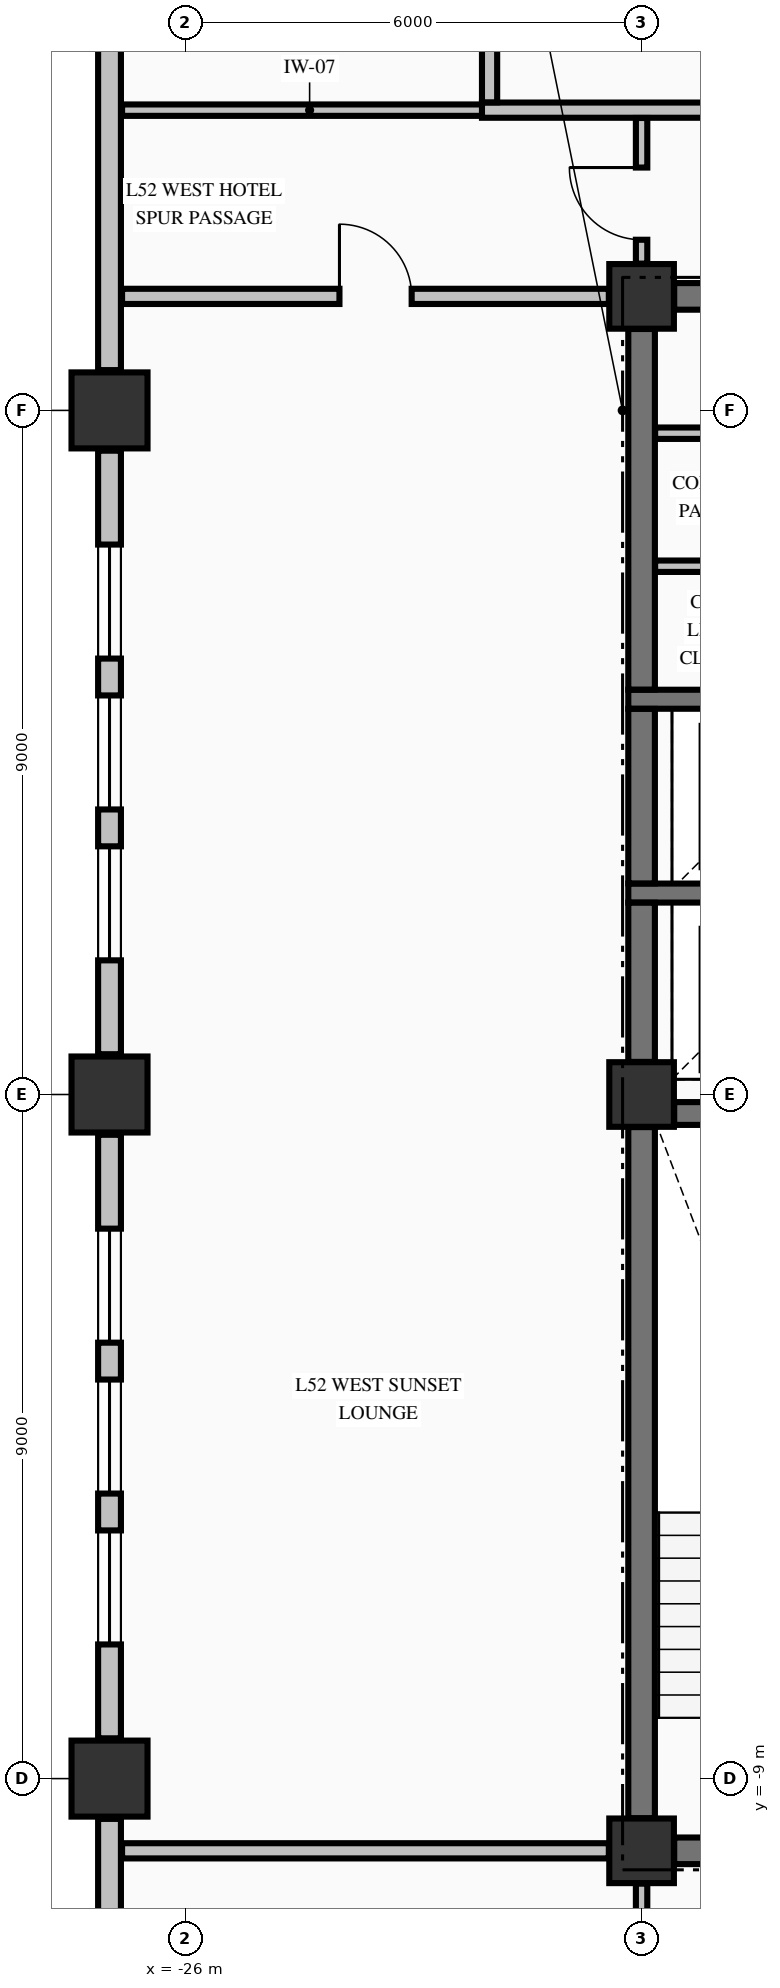
"""IFC4 building model, lengths in metres.
Left out: names, types, materials, properties, quantities, classifications, styles, units other than length and angle.
Written with IfcOpenShell. Run it as: python <this file> out.ifc"""

import sys

from ifc_helpers import new_model, si_unit, direction, frame, frame_2d, origin, origin_2d, place, context, subcontext, project, spatial, rectangle, extrude, element, fill, save


model = new_model("IFC4")
c1 = context("Model", 3, precision=1e-05, world=origin(), true_north=direction((0.0, 1.0)))
c2 = subcontext(c1, "Body", "Model", "MODEL_VIEW")
j1 = project(units=[si_unit("LENGTHUNIT", "METRE"), si_unit("PLANEANGLEUNIT", "RADIAN")], contexts=[c1])
p1 = place(None, origin())
s1 = spatial("IfcSite", under=j1, at=p1, CompositionType="ELEMENT")
p2 = place(p1, origin())
s2 = spatial("IfcBuilding", under=s1, at=p2, CompositionType="ELEMENT")
p3 = place(p2, frame((0.0, 0.0, 201.66)))
s3 = spatial("IfcBuildingStorey", under=s2, at=p3, CompositionType="ELEMENT", Elevation=201.66)
for number, where, z_axis, x_axis in (
    (1, (-27.0, -9.0, -0.25), (0.0, 0.0, 1.0), (1.0, 0.0, 0.0)),
    (2, (-27.0, 0.0, -0.25), (0.0, 0.0, 1.0), (1.0, 0.0, 0.0)),
    (3, (-27.0, 9.0, -0.25), (0.0, 0.0, 1.0), (1.0, 0.0, 0.0)),
):
    element("IfcColumn", number, at=place(p3, frame(where, z_axis=z_axis, x_axis=x_axis)), inside=s3, PredefinedType="COLUMN", context=c2, shape_type="SweptSolid", body=[
        extrude(rectangle(XDim=1.0, YDim=1.0, at=origin_2d()), origin(), (0.0, 0.0, 1.0), 3.4),
    ])
for number, where, z_axis, x_axis in (
    (4, (-20.0, -9.95, -0.25), (0.0, 0.0, 1.0), (1.0, 0.0, 0.0)),
    (5, (-20.0, 10.5, -0.25), (0.0, 0.0, 1.0), (1.0, 0.0, 0.0)),
    (6, (-20.0, 0.0, -0.25), (0.0, 0.0, 1.0), (1.0, 0.0, 0.0)),
):
    element("IfcColumn", number, at=place(p3, frame(where, z_axis=z_axis, x_axis=x_axis)), inside=s3, PredefinedType="COLUMN", context=c2, shape_type="SweptSolid", body=[
        extrude(rectangle(XDim=0.85, YDim=0.85, at=origin_2d()), origin(), (0.0, 0.0, 1.0), 3.4),
    ])
p4 = place(p3, frame((-27.0, -9.53, 0.0), z_axis=(0.0, 0.0, 1.0), x_axis=(0.0, -1.0, 0.0)))
e7 = element("IfcWall", 7, at=p4, inside=s3, PredefinedType="STANDARD", context=c2, shape_type="SweptSolid", body=[
    extrude(rectangle(XDim=9.44, YDim=0.3, at=frame_2d((4.72, 0.0))), origin(), (0.0, 0.0, 1.0), 2.542),
])
p5 = place(p3, frame((-27.0, -0.53, 0.0), z_axis=(0.0, 0.0, 1.0), x_axis=(0.0, -1.0, 0.0)))
e8 = element("IfcWall", 8, at=p5, inside=s3, PredefinedType="STANDARD", context=c2, shape_type="SweptSolid", body=[
    extrude(rectangle(XDim=7.94, YDim=0.3, at=frame_2d((3.97, 0.0))), origin(), (0.0, 0.0, 1.0), 2.542),
])
p6 = place(p5, frame((1.235, 0.0, 0.72)))
e9 = element("IfcOpeningElement", 9, at=p6, cuts=e8, PredefinedType="OPENING", context=c2, shape_type="SweptSolid", body=[
    extrude(rectangle(XDim=1.5, YDim=1.6, at=frame_2d((0.75, 0.8))), frame((0.0, 0.16, 0.0), z_axis=(0.0, -1.0, 0.0), x_axis=(1.0, 0.0, 0.0)), (0.0, 0.0, 1.0), 0.32),
])
p7 = place(p5, frame((3.22, 0.0, 0.72)))
e10 = element("IfcOpeningElement", 10, at=p7, cuts=e8, PredefinedType="OPENING", context=c2, shape_type="SweptSolid", body=[
    extrude(rectangle(XDim=1.5, YDim=1.6, at=frame_2d((0.75, 0.8))), frame((0.0, 0.16, 0.0), z_axis=(0.0, -1.0, 0.0), x_axis=(1.0, 0.0, 0.0)), (0.0, 0.0, 1.0), 0.32),
])
p8 = place(p5, frame((5.205, 0.0, 0.72)))
e11 = element("IfcOpeningElement", 11, at=p8, cuts=e8, PredefinedType="OPENING", context=c2, shape_type="SweptSolid", body=[
    extrude(rectangle(XDim=1.5, YDim=1.6, at=frame_2d((0.75, 0.8))), frame((0.0, 0.16, 0.0), z_axis=(0.0, -1.0, 0.0), x_axis=(1.0, 0.0, 0.0)), (0.0, 0.0, 1.0), 0.32),
])
p9 = place(p3, frame((-27.0, 8.47, 0.0), z_axis=(0.0, 0.0, 1.0), x_axis=(0.0, -1.0, 0.0)))
e12 = element("IfcWall", 12, at=p9, inside=s3, PredefinedType="STANDARD", context=c2, shape_type="SweptSolid", body=[
    extrude(rectangle(XDim=7.94, YDim=0.3, at=frame_2d((3.97, 0.0))), origin(), (0.0, 0.0, 1.0), 2.542),
])
p10 = place(p9, frame((1.235, 0.0, 0.72)))
e13 = element("IfcOpeningElement", 13, at=p10, cuts=e12, PredefinedType="OPENING", context=c2, shape_type="SweptSolid", body=[
    extrude(rectangle(XDim=1.5, YDim=1.6, at=frame_2d((0.75, 0.8))), frame((0.0, 0.16, 0.0), z_axis=(0.0, -1.0, 0.0), x_axis=(1.0, 0.0, 0.0)), (0.0, 0.0, 1.0), 0.32),
])
p11 = place(p9, frame((3.22, 0.0, 0.72)))
e14 = element("IfcOpeningElement", 14, at=p11, cuts=e12, PredefinedType="OPENING", context=c2, shape_type="SweptSolid", body=[
    extrude(rectangle(XDim=1.5, YDim=1.6, at=frame_2d((0.75, 0.8))), frame((0.0, 0.16, 0.0), z_axis=(0.0, -1.0, 0.0), x_axis=(1.0, 0.0, 0.0)), (0.0, 0.0, 1.0), 0.32),
])
p12 = place(p9, frame((5.205, 0.0, 0.72)))
e15 = element("IfcOpeningElement", 15, at=p12, cuts=e12, PredefinedType="OPENING", context=c2, shape_type="SweptSolid", body=[
    extrude(rectangle(XDim=1.5, YDim=1.6, at=frame_2d((0.75, 0.8))), frame((0.0, 0.16, 0.0), z_axis=(0.0, -1.0, 0.0), x_axis=(1.0, 0.0, 0.0)), (0.0, 0.0, 1.0), 0.32),
])
p13 = place(p3, frame((-27.0, 18.97, 0.0), z_axis=(0.0, 0.0, 1.0), x_axis=(0.0, -1.0, 0.0)))
e16 = element("IfcWall", 16, at=p13, inside=s3, PredefinedType="STANDARD", context=c2, shape_type="SweptSolid", body=[
    extrude(rectangle(XDim=9.44, YDim=0.3, at=frame_2d((4.72, 0.0))), origin(), (0.0, 0.0, 1.0), 2.542),
])
p14 = place(p3, frame((-19.571, -9.95, 0.0), z_axis=(0.0, 0.0, 1.0), x_axis=(1.0, 0.0, 0.0)))
e17 = element("IfcWall", 17, at=p14, inside=s3, PredefinedType="SHEAR", context=c2, shape_type="SweptSolid", body=[
    extrude(rectangle(XDim=4.871, YDim=0.35, at=frame_2d((2.436, 0.0))), origin(), (0.0, 0.0, 1.0), 3.15),
])
p15 = place(p14, frame((0.746, 0.0, 0.0)))
e18 = element("IfcOpeningElement", 18, at=p15, cuts=e17, PredefinedType="OPENING", context=c2, shape_type="SweptSolid", body=[
    extrude(rectangle(XDim=1.05, YDim=2.15, at=frame_2d((0.525, 1.075))), frame((0.0, 0.185, 0.0), z_axis=(0.0, -1.0, 0.0), x_axis=(1.0, 0.0, 0.0)), (0.0, 0.0, 1.0), 0.37),
])
p16 = place(p3, frame((-19.571, -0.25, 0.0), z_axis=(0.0, 0.0, 1.0), x_axis=(1.0, 0.0, 0.0)))
e19 = element("IfcWall", 19, at=p16, inside=s3, PredefinedType="SHEAR", context=c2, shape_type="SweptSolid", body=[
    extrude(rectangle(XDim=8.142, YDim=0.3, at=frame_2d((4.071, 0.0))), origin(), (0.0, 0.0, 1.0), 3.15),
])
p17 = place(p16, frame((5.871, 0.0, 0.0)))
e20 = element("IfcOpeningElement", 20, at=p17, cuts=e19, PredefinedType="OPENING", context=c2, shape_type="SweptSolid", body=[
    extrude(rectangle(XDim=1.1, YDim=2.15, at=frame_2d((0.55, 1.075))), frame((0.0, 0.16, 0.0), z_axis=(0.0, -1.0, 0.0), x_axis=(1.0, 0.0, 0.0)), (0.0, 0.0, 1.0), 0.32),
])
for number, where, z_axis, x_axis in (
    (21, (-20.175, 2.65, 0.0), (0.0, 0.0, 1.0), (1.0, 0.0, 0.0)),
    (22, (-20.175, 5.2, 0.0), (0.0, 0.0, 1.0), (1.0, 0.0, 0.0)),
):
    element("IfcWall", number, at=place(p3, frame(where, z_axis=z_axis, x_axis=x_axis)), inside=s3, PredefinedType="SOLIDWALL", context=c2, shape_type="SweptSolid", body=[
        extrude(rectangle(XDim=3.2, YDim=0.25, at=frame_2d((1.6, 0.0))), origin(), (0.0, 0.0, 1.0), 3.15),
    ])
p18 = place(p3, frame((-19.571, 10.5, 0.0), z_axis=(0.0, 0.0, 1.0), x_axis=(1.0, 0.0, 0.0)))
e23 = element("IfcWall", 23, at=p18, inside=s3, PredefinedType="SHEAR", context=c2, shape_type="SweptSolid", body=[
    extrude(rectangle(XDim=4.871, YDim=0.35, at=frame_2d((2.436, 0.0))), origin(), (0.0, 0.0, 1.0), 3.15),
])
p19 = place(p18, frame((3.121, 0.0, 0.0)))
e24 = element("IfcOpeningElement", 24, at=p19, cuts=e23, PredefinedType="OPENING", context=c2, shape_type="SweptSolid", body=[
    extrude(rectangle(XDim=1.1, YDim=2.15, at=frame_2d((0.55, 1.075))), frame((0.0, 0.185, 0.0), z_axis=(0.0, -1.0, 0.0), x_axis=(1.0, 0.0, 0.0)), (0.0, 0.0, 1.0), 0.37),
])
p20 = place(p3, frame((-26.835, -9.95, 0.0), z_axis=(0.0, 0.0, 1.0), x_axis=(1.0, 0.0, 0.0)))
e25 = element("IfcWall", 25, at=p20, inside=s3, PredefinedType="PARTITIONING", context=c2, shape_type="SweptSolid", body=[
    extrude(rectangle(XDim=6.404, YDim=0.2, at=frame_2d((3.202, 0.0))), origin(), (0.0, 0.0, 1.0), 3.15),
])
for number, where, z_axis, x_axis in (
    (26, (-19.822, 6.95, 0.0), (0.0, 0.0, 1.0), (1.0, 0.0, 0.0)),
    (27, (-19.822, 8.7, 0.0), (0.0, 0.0, 1.0), (1.0, 0.0, 0.0)),
):
    element("IfcWall", number, at=place(p3, frame(where, z_axis=z_axis, x_axis=x_axis)), inside=s3, PredefinedType="PARTITIONING", context=c2, shape_type="SweptSolid", body=[
        extrude(rectangle(XDim=2.822, YDim=0.15, at=frame_2d((1.411, 0.0))), origin(), (0.0, 0.0, 1.0), 3.15),
    ])
p21 = place(p3, frame((-26.835, 10.5, 0.0), z_axis=(0.0, 0.0, 1.0), x_axis=(1.0, 0.0, 0.0)))
e28 = element("IfcWall", 28, at=p21, inside=s3, PredefinedType="PARTITIONING", context=c2, shape_type="SweptSolid", body=[
    extrude(rectangle(XDim=6.404, YDim=0.2, at=frame_2d((3.202, 0.0))), origin(), (0.0, 0.0, 1.0), 3.15),
])
p22 = place(p21, frame((2.86, 0.0, 0.0)))
e29 = element("IfcOpeningElement", 29, at=p22, cuts=e28, PredefinedType="OPENING", context=c2, shape_type="SweptSolid", body=[
    extrude(rectangle(XDim=0.95, YDim=2.15, at=frame_2d((0.475, 1.075))), frame((0.0, 0.11, 0.0), z_axis=(0.0, -1.0, 0.0), x_axis=(1.0, 0.0, 0.0)), (0.0, 0.0, 1.0), 0.22),
])
p23 = place(p3, frame((-26.835, 12.95, 0.0), z_axis=(0.0, 0.0, 1.0), x_axis=(1.0, 0.0, 0.0)))
e30 = element("IfcWall", 30, at=p23, inside=s3, PredefinedType="PARTITIONING", context=c2, shape_type="SweptSolid", body=[
    extrude(rectangle(XDim=4.935, YDim=0.15, at=frame_2d((2.468, 0.0))), origin(), (0.0, 0.0, 1.0), 3.15),
])
p24 = place(p3, frame((-22.1, 12.95, 0.0), z_axis=(0.0, 0.0, 1.0), x_axis=(1.0, 0.0, 0.0)))
e31 = element("IfcWall", 31, at=p24, inside=s3, PredefinedType="PARTITIONING", context=c2, shape_type="SweptSolid", body=[
    extrude(rectangle(XDim=39.2, YDim=0.2, at=frame_2d((19.6, 0.0))), origin(), (0.0, 0.0, 1.0), 3.15),
])
p25 = place(p24, frame((4.525, 0.0, 0.0)))
e32 = element("IfcOpeningElement", 32, at=p25, cuts=e31, PredefinedType="OPENING", context=c2, shape_type="SweptSolid", body=[
    extrude(rectangle(XDim=0.95, YDim=2.15, at=frame_2d((0.475, 1.075))), frame((0.0, 0.11, 0.0), z_axis=(0.0, -1.0, 0.0), x_axis=(1.0, 0.0, 0.0)), (0.0, 0.0, 1.0), 0.22),
])
p26 = place(p24, frame((12.475, 0.0, 0.0)))
e33 = element("IfcOpeningElement", 33, at=p26, cuts=e31, PredefinedType="OPENING", context=c2, shape_type="SweptSolid", body=[
    extrude(rectangle(XDim=0.95, YDim=2.15, at=frame_2d((0.475, 1.075))), frame((0.0, 0.11, 0.0), z_axis=(0.0, -1.0, 0.0), x_axis=(1.0, 0.0, 0.0)), (0.0, 0.0, 1.0), 0.22),
])
p27 = place(p24, frame((22.175, 0.0, 0.0)))
e34 = element("IfcOpeningElement", 34, at=p27, cuts=e31, PredefinedType="OPENING", context=c2, shape_type="SweptSolid", body=[
    extrude(rectangle(XDim=0.95, YDim=2.15, at=frame_2d((0.475, 1.075))), frame((0.0, 0.11, 0.0), z_axis=(0.0, -1.0, 0.0), x_axis=(1.0, 0.0, 0.0)), (0.0, 0.0, 1.0), 0.22),
])
p28 = place(p24, frame((34.675, 0.0, 0.0)))
e35 = element("IfcOpeningElement", 35, at=p28, cuts=e31, PredefinedType="OPENING", context=c2, shape_type="SweptSolid", body=[
    extrude(rectangle(XDim=0.95, YDim=2.15, at=frame_2d((0.475, 1.075))), frame((0.0, 0.11, 0.0), z_axis=(0.0, -1.0, 0.0), x_axis=(1.0, 0.0, 0.0)), (0.0, 0.0, 1.0), 0.22),
])
p29 = place(p3, frame((-20.0, -9.521, 0.0), z_axis=(0.0, 0.0, 1.0), x_axis=(0.0, 1.0, 0.0)))
e36 = element("IfcWall", 36, at=p29, inside=s3, PredefinedType="SHEAR", context=c2, shape_type="SweptSolid", body=[
    extrude(rectangle(XDim=9.092, YDim=0.35, at=frame_2d((4.546, 0.0))), origin(), (0.0, 0.0, 1.0), 3.15),
])
p30 = place(p3, frame((-20.0, 0.429, 0.0), z_axis=(0.0, 0.0, 1.0), x_axis=(0.0, 1.0, 0.0)))
e37 = element("IfcWall", 37, at=p30, inside=s3, PredefinedType="SHEAR", context=c2, shape_type="SweptSolid", body=[
    extrude(rectangle(XDim=2.094, YDim=0.35, at=frame_2d((1.047, 0.0))), origin(), (0.0, 0.0, 1.0), 3.15),
])
p31 = place(p3, frame((-20.0, 2.777, 0.0), z_axis=(0.0, 0.0, 1.0), x_axis=(0.0, 1.0, 0.0)))
e38 = element("IfcWall", 38, at=p31, inside=s3, PredefinedType="SHEAR", context=c2, shape_type="SweptSolid", body=[
    extrude(rectangle(XDim=2.296, YDim=0.35, at=frame_2d((1.148, 0.0))), origin(), (0.0, 0.0, 1.0), 3.15),
])
p32 = place(p3, frame((-20.0, 5.327, 0.0), z_axis=(0.0, 0.0, 1.0), x_axis=(0.0, 1.0, 0.0)))
e39 = element("IfcWall", 39, at=p32, inside=s3, PredefinedType="SHEAR", context=c2, shape_type="SweptSolid", body=[
    extrude(rectangle(XDim=4.744, YDim=0.35, at=frame_2d((2.372, 0.0))), origin(), (0.0, 0.0, 1.0), 3.15),
])
p33 = place(p3, frame((-22.0, 13.053, 0.0), z_axis=(0.0, 0.0, 1.0), x_axis=(0.0, 1.0, 0.0)))
e40 = element("IfcWall", 40, at=p33, inside=s3, PredefinedType="PARTITIONING", context=c2, shape_type="SweptSolid", body=[
    extrude(rectangle(XDim=5.941, YDim=0.2, at=frame_2d((2.97, 0.0))), origin(), (0.0, 0.0, 1.0), 3.15),
])
p34 = place(p3, frame((-20.0, -12.997, 0.0), z_axis=(0.0, 0.0, 1.0), x_axis=(0.0, 1.0, 0.0)))
e41 = element("IfcWall", 41, at=p34, inside=s3, PredefinedType="PARTITIONING", context=c2, shape_type="SweptSolid", body=[
    extrude(rectangle(XDim=2.616, YDim=0.15, at=frame_2d((1.308, 0.0))), origin(), (0.0, 0.0, 1.0), 2.342),
])
p35 = place(p3, frame((-20.0, 10.931, 0.0), z_axis=(0.0, 0.0, 1.0), x_axis=(0.0, 1.0, 0.0)))
e42 = element("IfcWall", 42, at=p35, inside=s3, PredefinedType="PARTITIONING", context=c2, shape_type="SweptSolid", body=[
    extrude(rectangle(XDim=1.916, YDim=0.15, at=frame_2d((0.958, 0.0))), origin(), (0.0, 0.0, 1.0), 2.342),
])
p36 = place(p35, frame((0.314, 0.0, 0.0)))
e43 = element("IfcOpeningElement", 43, at=p36, cuts=e42, PredefinedType="OPENING", context=c2, shape_type="SweptSolid", body=[
    extrude(rectangle(XDim=0.95, YDim=2.15, at=frame_2d((0.475, 1.075))), frame((0.0, 0.085, 0.0), z_axis=(0.0, -1.0, 0.0), x_axis=(1.0, 0.0, 0.0)), (0.0, 0.0, 1.0), 0.17),
])
p37 = place(p6, origin())
e44 = element("IfcWindow", 44, at=p37, inside=s3, PartitioningType="SINGLE_PANEL", PredefinedType="WINDOW", context=c2, shape_type="SweptSolid", body=[
    extrude(rectangle(XDim=1.5, YDim=1.6, at=frame_2d((0.75, 0.8))), frame((0.0, 0.03, 0.0), z_axis=(0.0, -1.0, 0.0), x_axis=(1.0, 0.0, 0.0)), (0.0, 0.0, 1.0), 0.06),
])
fill(e9, e44)
p38 = place(p7, origin())
e45 = element("IfcWindow", 45, at=p38, inside=s3, PartitioningType="SINGLE_PANEL", PredefinedType="WINDOW", context=c2, shape_type="SweptSolid", body=[
    extrude(rectangle(XDim=1.5, YDim=1.6, at=frame_2d((0.75, 0.8))), frame((0.0, 0.03, 0.0), z_axis=(0.0, -1.0, 0.0), x_axis=(1.0, 0.0, 0.0)), (0.0, 0.0, 1.0), 0.06),
])
fill(e10, e45)
p39 = place(p8, origin())
e46 = element("IfcWindow", 46, at=p39, inside=s3, PartitioningType="SINGLE_PANEL", PredefinedType="WINDOW", context=c2, shape_type="SweptSolid", body=[
    extrude(rectangle(XDim=1.5, YDim=1.6, at=frame_2d((0.75, 0.8))), frame((0.0, 0.03, 0.0), z_axis=(0.0, -1.0, 0.0), x_axis=(1.0, 0.0, 0.0)), (0.0, 0.0, 1.0), 0.06),
])
fill(e11, e46)
p40 = place(p10, origin())
e47 = element("IfcWindow", 47, at=p40, inside=s3, PartitioningType="SINGLE_PANEL", PredefinedType="WINDOW", context=c2, shape_type="SweptSolid", body=[
    extrude(rectangle(XDim=1.5, YDim=1.6, at=frame_2d((0.75, 0.8))), frame((0.0, 0.03, 0.0), z_axis=(0.0, -1.0, 0.0), x_axis=(1.0, 0.0, 0.0)), (0.0, 0.0, 1.0), 0.06),
])
fill(e13, e47)
p41 = place(p11, origin())
e48 = element("IfcWindow", 48, at=p41, inside=s3, PartitioningType="SINGLE_PANEL", PredefinedType="WINDOW", context=c2, shape_type="SweptSolid", body=[
    extrude(rectangle(XDim=1.5, YDim=1.6, at=frame_2d((0.75, 0.8))), frame((0.0, 0.03, 0.0), z_axis=(0.0, -1.0, 0.0), x_axis=(1.0, 0.0, 0.0)), (0.0, 0.0, 1.0), 0.06),
])
fill(e14, e48)
p42 = place(p12, origin())
e49 = element("IfcWindow", 49, at=p42, inside=s3, PartitioningType="SINGLE_PANEL", PredefinedType="WINDOW", context=c2, shape_type="SweptSolid", body=[
    extrude(rectangle(XDim=1.5, YDim=1.6, at=frame_2d((0.75, 0.8))), frame((0.0, 0.03, 0.0), z_axis=(0.0, -1.0, 0.0), x_axis=(1.0, 0.0, 0.0)), (0.0, 0.0, 1.0), 0.06),
])
fill(e15, e49)
p43 = place(p36, origin())
e50 = element("IfcDoor", 50, at=p43, inside=s3, OperationType="SINGLE_SWING_RIGHT", PredefinedType="DOOR", context=c2, shape_type="SweptSolid", body=[
    extrude(rectangle(XDim=0.95, YDim=2.15, at=frame_2d((0.475, 1.075))), frame((0.0, 0.025, 0.0), z_axis=(0.0, -1.0, 0.0), x_axis=(1.0, 0.0, 0.0)), (0.0, 0.0, 1.0), 0.05),
])
fill(e43, e50)
p44 = place(p22, origin())
e51 = element("IfcDoor", 51, at=p44, inside=s3, OperationType="SINGLE_SWING_LEFT", PredefinedType="DOOR", context=c2, shape_type="SweptSolid", body=[
    extrude(rectangle(XDim=0.95, YDim=2.15, at=frame_2d((0.475, 1.075))), frame((0.0, 0.025, 0.0), z_axis=(0.0, -1.0, 0.0), x_axis=(1.0, 0.0, 0.0)), (0.0, 0.0, 1.0), 0.05),
])
fill(e29, e51)
save(model, sys.argv[1])
